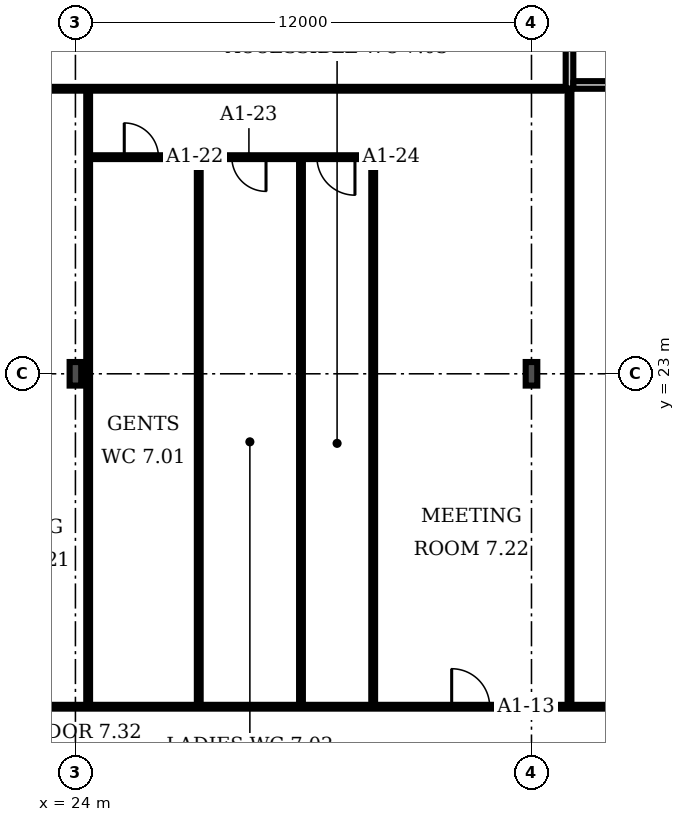
"""IFC4 building model, lengths in metres.
Left out: names, types, materials, properties, quantities, classifications, styles, units other than length and angle.
Written with IfcOpenShell. Run it as: python <this file> out.ifc"""

import sys

from ifc_helpers import new_model, si_unit, direction, frame, frame_2d, origin, origin_2d, place, context, subcontext, project, spatial, rectangle, i_section, extrude, element, fill, save


model = new_model("IFC4")
c1 = context("Model", 3, precision=1e-05, world=origin(), true_north=direction((0.0, 1.0)))
c2 = subcontext(c1, "Body", "Model", "MODEL_VIEW")
j1 = project(units=[si_unit("LENGTHUNIT", "METRE"), si_unit("PLANEANGLEUNIT", "RADIAN")], contexts=[c1])
p1 = place(None, origin())
s1 = spatial("IfcSite", under=j1, at=p1, CompositionType="ELEMENT")
p2 = place(p1, origin())
s2 = spatial("IfcBuilding", under=s1, at=p2, CompositionType="ELEMENT")
p3 = place(p2, frame((0.0, 0.0, 45.1)))
s3 = spatial("IfcBuildingStorey", under=s2, at=p3, CompositionType="ELEMENT", Elevation=45.1)
for number, where, z_axis, x_axis in (
    (1, (24.0, 23.0, 0.0), (0.0, 0.0, 1.0), (1.0, 0.0, 0.0)),
    (2, (36.0, 23.0, 0.0), (0.0, 0.0, 1.0), (1.0, 0.0, 0.0)),
):
    element("IfcColumn", number, at=place(p3, frame(where, z_axis=z_axis, x_axis=x_axis)), inside=s3, PredefinedType="COLUMN", context=c2, shape_type="SweptSolid", body=[
        extrude(i_section(OverallWidth=0.305, OverallDepth=0.62, WebThickness=0.021, FlangeThickness=0.04, FilletRadius=0.027, at=origin_2d()), origin(), (0.0, 0.0, 1.0), 3.6),
    ])
p4 = place(p3, frame((37.0, 30.5, 0.0), z_axis=(0.0, 0.0, 1.0), x_axis=(0.0, 1.0, 0.0)))
e3 = element("IfcWall", 3, at=p4, inside=s3, PredefinedType="PARTITIONING", context=c2, shape_type="SweptSolid", body=[
    extrude(rectangle(XDim=3.5, YDim=0.2, at=frame_2d((1.75, 0.0))), origin(), (0.0, 0.0, 1.0), 3.2),
])
p5 = place(p4, frame((1.2, 0.0, 0.0)))
e4 = element("IfcOpeningElement", 4, at=p5, cuts=e3, PredefinedType="OPENING", context=c2, shape_type="SweptSolid", body=[
    extrude(rectangle(XDim=1.1, YDim=2.1, at=frame_2d((0.55, 1.05))), frame((0.0, 0.11, 0.0), z_axis=(0.0, -1.0, 0.0), x_axis=(1.0, 0.0, 0.0)), (0.0, 0.0, 1.0), 0.22),
])
p6 = place(p3, frame((37.1, 30.6, 0.0), z_axis=(0.0, 0.0, 1.0), x_axis=(1.0, 0.0, 0.0)))
e5 = element("IfcWall", 5, at=p6, inside=s3, PredefinedType="PARTITIONING", context=c2, shape_type="SweptSolid", body=[
    extrude(rectangle(XDim=2.8, YDim=0.2, at=frame_2d((1.4, 0.0))), origin(), (0.0, 0.0, 1.0), 3.2),
])
p7 = place(p3, frame((10.8, 30.5, 0.0), z_axis=(0.0, 0.0, 1.0), x_axis=(1.0, 0.0, 0.0)))
e6 = element("IfcWall", 6, at=p7, inside=s3, PredefinedType="PARTITIONING", context=c2, shape_type="SweptSolid", body=[
    extrude(rectangle(XDim=26.05, YDim=0.1, at=frame_2d((13.025, 0.0))), origin(), (0.0, 0.0, 1.0), 3.2),
])
p8 = place(p7, frame((0.235, 0.0, 0.0)))
e7 = element("IfcOpeningElement", 7, at=p8, cuts=e6, PredefinedType="OPENING", context=c2, shape_type="SweptSolid", body=[
    extrude(rectangle(XDim=1.0, YDim=2.1, at=frame_2d((0.5, 1.05))), frame((0.0, 0.06, 0.0), z_axis=(0.0, -1.0, 0.0), x_axis=(1.0, 0.0, 0.0)), (0.0, 0.0, 1.0), 0.12),
])
p9 = place(p7, frame((10.955, 0.0, 0.0)))
e8 = element("IfcOpeningElement", 8, at=p9, cuts=e6, PredefinedType="OPENING", context=c2, shape_type="SweptSolid", body=[
    extrude(rectangle(XDim=1.0, YDim=2.1, at=frame_2d((0.5, 1.05))), frame((0.0, 0.06, 0.0), z_axis=(0.0, -1.0, 0.0), x_axis=(1.0, 0.0, 0.0)), (0.0, 0.0, 1.0), 0.12),
])
p10 = place(p3, frame((11.2, 14.24, 0.0), z_axis=(0.0, 0.0, 1.0), x_axis=(1.0, 0.0, 0.0)))
e9 = element("IfcWall", 9, at=p10, inside=s3, PredefinedType="PARTITIONING", context=c2, shape_type="SweptSolid", body=[
    extrude(rectangle(XDim=51.635, YDim=0.1, at=frame_2d((25.817, 0.0))), origin(), (0.0, 0.0, 1.0), 3.2),
])
p11 = place(p10, frame((0.115, 0.0, 0.0)))
e10 = element("IfcOpeningElement", 10, at=p11, cuts=e9, PredefinedType="OPENING", context=c2, shape_type="SweptSolid", body=[
    extrude(rectangle(XDim=1.0, YDim=2.1, at=frame_2d((0.5, 1.05))), frame((0.0, 0.06, 0.0), z_axis=(0.0, -1.0, 0.0), x_axis=(1.0, 0.0, 0.0)), (0.0, 0.0, 1.0), 0.12),
])
p12 = place(p10, frame((6.635, 0.0, 0.0)))
e11 = element("IfcOpeningElement", 11, at=p12, cuts=e9, PredefinedType="OPENING", context=c2, shape_type="SweptSolid", body=[
    extrude(rectangle(XDim=1.0, YDim=2.1, at=frame_2d((0.5, 1.05))), frame((0.0, 0.06, 0.0), z_axis=(0.0, -1.0, 0.0), x_axis=(1.0, 0.0, 0.0)), (0.0, 0.0, 1.0), 0.12),
])
p13 = place(p10, frame((22.7, 0.0, 0.0)))
e12 = element("IfcOpeningElement", 12, at=p13, cuts=e9, PredefinedType="OPENING", context=c2, shape_type="SweptSolid", body=[
    extrude(rectangle(XDim=1.0, YDim=2.1, at=frame_2d((0.5, 1.05))), frame((0.0, 0.06, 0.0), z_axis=(0.0, -1.0, 0.0), x_axis=(1.0, 0.0, 0.0)), (0.0, 0.0, 1.0), 0.12),
])
p14 = place(p10, frame((27.865, 0.0, 0.0)))
e13 = element("IfcOpeningElement", 13, at=p14, cuts=e9, PredefinedType="OPENING", context=c2, shape_type="SweptSolid", body=[
    extrude(rectangle(XDim=1.0, YDim=2.1, at=frame_2d((0.5, 1.05))), frame((0.0, 0.06, 0.0), z_axis=(0.0, -1.0, 0.0), x_axis=(1.0, 0.0, 0.0)), (0.0, 0.0, 1.0), 0.12),
])
p15 = place(p10, frame((34.065, 0.0, 0.0)))
e14 = element("IfcOpeningElement", 14, at=p15, cuts=e9, PredefinedType="OPENING", context=c2, shape_type="SweptSolid", body=[
    extrude(rectangle(XDim=1.8, YDim=2.1, at=frame_2d((0.9, 1.05))), frame((0.0, 0.06, 0.0), z_axis=(0.0, -1.0, 0.0), x_axis=(1.0, 0.0, 0.0)), (0.0, 0.0, 1.0), 0.12),
])
p16 = place(p10, frame((41.765, 0.0, 0.0)))
e15 = element("IfcOpeningElement", 15, at=p16, cuts=e9, PredefinedType="OPENING", context=c2, shape_type="SweptSolid", body=[
    extrude(rectangle(XDim=1.8, YDim=2.1, at=frame_2d((0.9, 1.05))), frame((0.0, 0.06, 0.0), z_axis=(0.0, -1.0, 0.0), x_axis=(1.0, 0.0, 0.0)), (0.0, 0.0, 1.0), 0.12),
])
p17 = place(p3, frame((24.335, 14.24, 0.0), z_axis=(0.0, 0.0, 1.0), x_axis=(0.0, 1.0, 0.0)))
e16 = element("IfcWall", 16, at=p17, inside=s3, PredefinedType="PARTITIONING", context=c2, shape_type="SweptSolid", body=[
    extrude(rectangle(XDim=16.25, YDim=0.1, at=frame_2d((8.125, 0.0))), origin(), (0.0, 0.0, 1.0), 3.2),
])
p18 = place(p3, frame((24.335, 28.7, 0.0), z_axis=(0.0, 0.0, 1.0), x_axis=(1.0, 0.0, 0.0)))
e17 = element("IfcWall", 17, at=p18, inside=s3, PredefinedType="PARTITIONING", context=c2, shape_type="SweptSolid", body=[
    extrude(rectangle(XDim=7.5, YDim=0.1, at=frame_2d((3.75, 0.0))), origin(), (0.0, 0.0, 1.0), 3.2),
])
p19 = place(p18, frame((0.95, 0.0, 0.0)))
e18 = element("IfcOpeningElement", 18, at=p19, cuts=e17, PredefinedType="OPENING", context=c2, shape_type="SweptSolid", body=[
    extrude(rectangle(XDim=0.9, YDim=2.1, at=frame_2d((0.45, 1.05))), frame((0.0, 0.06, 0.0), z_axis=(0.0, -1.0, 0.0), x_axis=(1.0, 0.0, 0.0)), (0.0, 0.0, 1.0), 0.12),
])
p20 = place(p18, frame((3.78, 0.0, 0.0)))
e19 = element("IfcOpeningElement", 19, at=p20, cuts=e17, PredefinedType="OPENING", context=c2, shape_type="SweptSolid", body=[
    extrude(rectangle(XDim=0.9, YDim=2.1, at=frame_2d((0.45, 1.05))), frame((0.0, 0.06, 0.0), z_axis=(0.0, -1.0, 0.0), x_axis=(1.0, 0.0, 0.0)), (0.0, 0.0, 1.0), 0.12),
])
p21 = place(p18, frame((6.02, 0.0, 0.0)))
e20 = element("IfcOpeningElement", 20, at=p21, cuts=e17, PredefinedType="OPENING", context=c2, shape_type="SweptSolid", body=[
    extrude(rectangle(XDim=1.0, YDim=2.1, at=frame_2d((0.5, 1.05))), frame((0.0, 0.06, 0.0), z_axis=(0.0, -1.0, 0.0), x_axis=(1.0, 0.0, 0.0)), (0.0, 0.0, 1.0), 0.12),
])
for number, where, z_axis, x_axis in (
    (21, (27.245, 14.24, 0.0), (0.0, 0.0, 1.0), (0.0, 1.0, 0.0)),
    (22, (29.935, 14.24, 0.0), (0.0, 0.0, 1.0), (0.0, 1.0, 0.0)),
    (23, (31.835, 14.24, 0.0), (0.0, 0.0, 1.0), (0.0, 1.0, 0.0)),
):
    element("IfcWall", number, at=place(p3, frame(where, z_axis=z_axis, x_axis=x_axis)), inside=s3, PredefinedType="PARTITIONING", context=c2, shape_type="SweptSolid", body=[
        extrude(rectangle(XDim=14.46, YDim=0.1, at=frame_2d((7.23, 0.0))), origin(), (0.0, 0.0, 1.0), 3.2),
    ])
p22 = place(p3, frame((37.0, 14.24, 0.0), z_axis=(0.0, 0.0, 1.0), x_axis=(0.0, 1.0, 0.0)))
e24 = element("IfcWall", 24, at=p22, inside=s3, PredefinedType="PARTITIONING", context=c2, shape_type="SweptSolid", body=[
    extrude(rectangle(XDim=16.26, YDim=0.1, at=frame_2d((8.13, 0.0))), origin(), (0.0, 0.0, 1.0), 3.2),
])
p23 = place(p13, origin())
e25 = element("IfcDoor", 25, at=p23, inside=s3, OperationType="SINGLE_SWING_LEFT", PredefinedType="DOOR", context=c2, shape_type="SweptSolid", body=[
    extrude(rectangle(XDim=1.0, YDim=2.1, at=frame_2d((0.5, 1.05))), frame((0.0, 0.025, 0.0), z_axis=(0.0, -1.0, 0.0), x_axis=(1.0, 0.0, 0.0)), (0.0, 0.0, 1.0), 0.05),
])
fill(e12, e25)
p24 = place(p19, origin())
e26 = element("IfcDoor", 26, at=p24, inside=s3, OperationType="SINGLE_SWING_LEFT", PredefinedType="DOOR", context=c2, shape_type="SweptSolid", body=[
    extrude(rectangle(XDim=0.9, YDim=2.1, at=frame_2d((0.45, 1.05))), frame((0.0, 0.025, 0.0), z_axis=(0.0, -1.0, 0.0), x_axis=(1.0, 0.0, 0.0)), (0.0, 0.0, 1.0), 0.05),
])
fill(e18, e26)
p25 = place(p20, origin())
e27 = element("IfcDoor", 27, at=p25, inside=s3, OperationType="SINGLE_SWING_RIGHT", PredefinedType="DOOR", context=c2, shape_type="SweptSolid", body=[
    extrude(rectangle(XDim=0.9, YDim=2.1, at=frame_2d((0.45, 1.05))), frame((0.0, 0.025, 0.0), z_axis=(0.0, -1.0, 0.0), x_axis=(1.0, 0.0, 0.0)), (0.0, 0.0, 1.0), 0.05),
])
fill(e19, e27)
p26 = place(p21, origin())
e28 = element("IfcDoor", 28, at=p26, inside=s3, OperationType="SINGLE_SWING_RIGHT", PredefinedType="DOOR", context=c2, shape_type="SweptSolid", body=[
    extrude(rectangle(XDim=1.0, YDim=2.1, at=frame_2d((0.5, 1.05))), frame((0.0, 0.025, 0.0), z_axis=(0.0, -1.0, 0.0), x_axis=(1.0, 0.0, 0.0)), (0.0, 0.0, 1.0), 0.05),
])
fill(e20, e28)
save(model, sys.argv[1])
